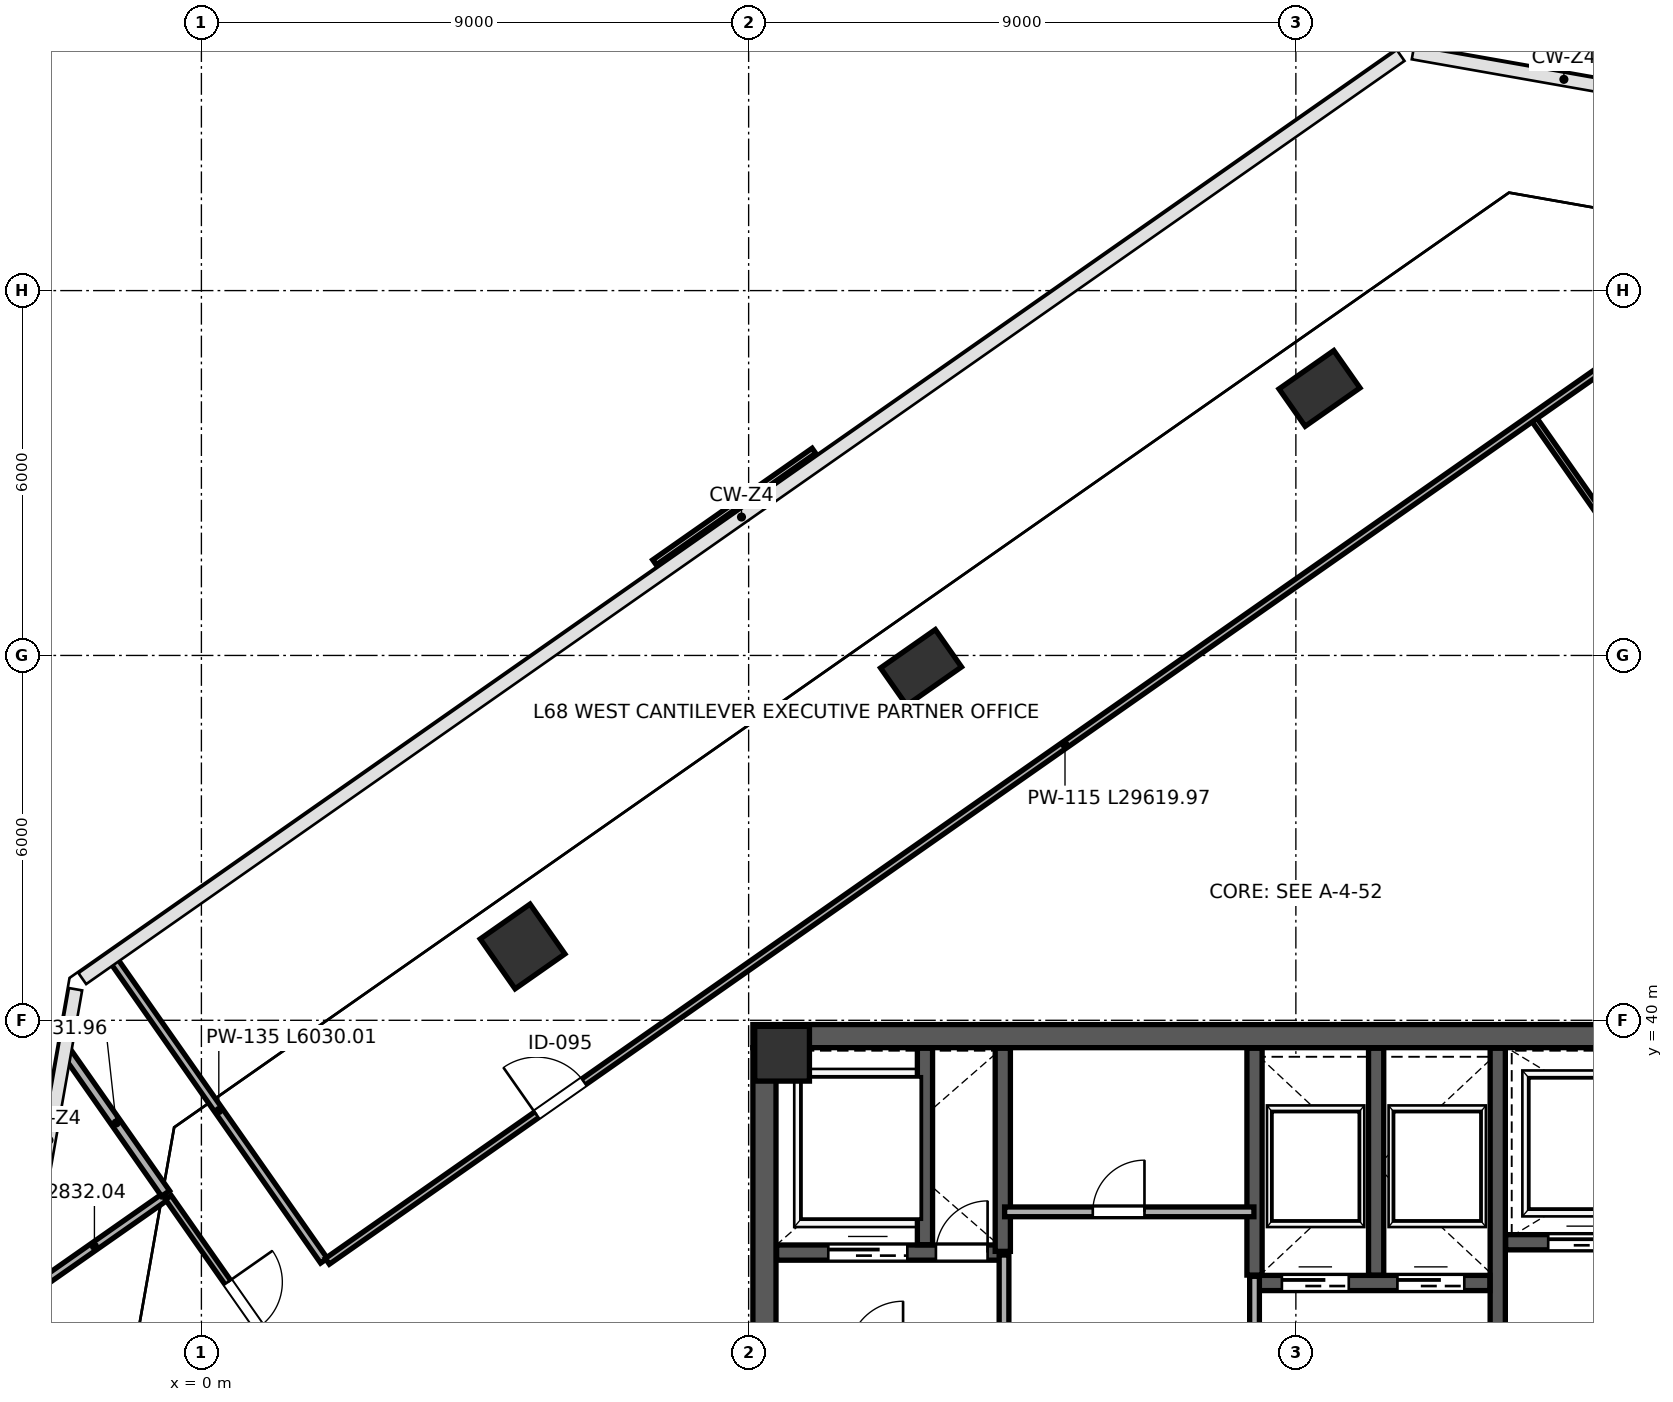
"""IFC4 building model, lengths in metres.
Left out: names, types, materials, properties, quantities, classifications, styles, units other than length and angle.
Written with IfcOpenShell. Run it as: python <this file> out.ifc"""

import sys

from ifc_helpers import new_model, si_unit, direction, frame, frame_2d, origin, origin_2d, place, context, subcontext, project, spatial, rectangle, extrude, clip, halfspace, source, transform, mapped, element, fill, save


model = new_model("IFC4")
c1 = context("Model", 3, precision=1e-05, world=origin(), true_north=direction((0.0, 1.0)))
c2 = subcontext(c1, "Body", "Model", "MODEL_VIEW")
j1 = project(units=[si_unit("LENGTHUNIT", "METRE"), si_unit("PLANEANGLEUNIT", "RADIAN")], contexts=[c1])
p1 = place(None, origin())
s1 = spatial("IfcSite", under=j1, at=p1, CompositionType="ELEMENT")
p2 = place(p1, origin())
s2 = spatial("IfcBuilding", under=s1, at=p2, CompositionType="ELEMENT")
p3 = place(p2, frame((0.0, 0.0, 303.0)))
s3 = spatial("IfcBuildingStorey", under=s2, at=p3, CompositionType="ELEMENT", Elevation=303.0)
m1 = source(origin(), c2, "Body", "SweptSolid", [
    extrude(rectangle(XDim=0.9, YDim=0.9, at=origin_2d()), origin(), (0.0, 0.0, 1.0), 4.198),
])
p4 = place(p3, frame((9.55, 39.45, 0.001), z_axis=(0.0, 0.0, 1.0), x_axis=(1.0, 0.0, 0.0)))
e1 = element("IfcColumn", 1, at=p4, inside=s3, PredefinedType="COLUMN", context=c2, shape_type="MappedRepresentation", body=[
    mapped(m1, transform((0.0, 0.0, 0.0), scale=1.0)),
])
p5 = place(p3, frame((5.282, 41.214, 0.0), z_axis=(0.097586490462, 0.163271900123, 0.981742921293), x_axis=(0.079753803382, -0.984561641117, 0.155813047227)))
e2 = element("IfcColumn", 2, at=p5, inside=s3, PredefinedType="COLUMN", context=c2, shape_type="Clipping", body=[
    clip(clip(extrude(rectangle(XDim=1.0, YDim=1.0, at=origin_2d()), origin(), (0.0, 0.0, 1.0), 4.278), halfspace(frame((0.0, 0.0, 0.136), z_axis=(0.0, 0.0, -1.0), x_axis=(1.0, 0.0, 0.0)), False)), halfspace(frame((0.0, 0.0, 4.142), z_axis=(0.0, 0.0, 1.0), x_axis=(1.0, 0.0, 0.0)), False)),
])
p6 = place(p3, frame((11.835, 45.803, 0.0), z_axis=(0.143375766237, 0.095793792698, 0.98502128857), x_axis=(-0.352266514368, -0.925179506593, 0.141248658171)))
e3 = element("IfcColumn", 3, at=p6, inside=s3, PredefinedType="PILASTER", context=c2, shape_type="Clipping", body=[
    clip(clip(extrude(rectangle(XDim=0.75, YDim=1.1, at=origin_2d()), origin(), (0.0, 0.0, 1.0), 4.264), halfspace(frame((0.0, 0.0, 0.11), z_axis=(0.0, 0.0, -1.0), x_axis=(1.0, 0.0, 0.0)), False)), halfspace(frame((0.0, 0.0, 4.154), z_axis=(0.0, 0.0, 1.0), x_axis=(1.0, 0.0, 0.0)), False)),
])
p7 = place(p3, frame((18.388, 50.391, 0.0), z_axis=(0.18821016759, 0.027620897851, 0.981740301107), x_axis=(-0.712388452059, -0.684267152176, 0.155824124661)))
e4 = element("IfcColumn", 4, at=p7, inside=s3, PredefinedType="PILASTER", context=c2, shape_type="Clipping", body=[
    clip(clip(extrude(rectangle(XDim=0.75, YDim=1.1, at=origin_2d()), origin(), (0.0, 0.0, 1.0), 4.278), halfspace(frame((0.0, 0.0, 0.121), z_axis=(0.0, 0.0, -1.0), x_axis=(1.0, 0.0, 0.0)), False)), halfspace(frame((0.0, 0.0, 4.157), z_axis=(0.0, 0.0, 1.0), x_axis=(1.0, 0.0, 0.0)), False)),
])
p8 = place(p3, frame((9.26, 24.45, 0.0), z_axis=(0.0, 0.0, 1.0), x_axis=(0.0, 1.0, 0.0)))
e5 = element("IfcWall", 5, at=p8, inside=s3, PredefinedType="SHEAR", context=c2, shape_type="SweptSolid", body=[
    extrude(rectangle(XDim=15.1, YDim=0.38, at=frame_2d((7.55, 0.0))), origin(), (0.0, 0.0, 1.0), 3.96),
])
p9 = place(p8, frame((8.7, 0.0, 0.0)))
e6 = element("IfcOpeningElement", 6, at=p9, cuts=e5, PredefinedType="OPENING", context=c2, shape_type="SweptSolid", body=[
    extrude(rectangle(XDim=1.15, YDim=2.2, at=frame_2d((0.575, 1.1))), frame((0.0, 0.2, 0.0), z_axis=(0.0, -1.0, 0.0), x_axis=(1.0, 0.0, 0.0)), (0.0, 0.0, 1.0), 0.4),
])
p10 = place(p3, frame((9.07, 39.74, 0.0), z_axis=(0.0, 0.0, 1.0), x_axis=(1.0, 0.0, 0.0)))
e7 = element("IfcWall", 7, at=p10, inside=s3, PredefinedType="SHEAR", context=c2, shape_type="SweptSolid", body=[
    extrude(rectangle(XDim=17.86, YDim=0.38, at=frame_2d((8.93, 0.0))), origin(), (0.0, 0.0, 1.0), 3.96),
])
p11 = place(p3, frame((21.32, 32.12, 0.0), z_axis=(0.0, 0.0, 1.0), x_axis=(0.0, 1.0, 0.0)))
e8 = element("IfcWall", 8, at=p11, inside=s3, PredefinedType="SHEAR", context=c2, shape_type="SweptSolid", body=[
    extrude(rectangle(XDim=7.42, YDim=0.25, at=frame_2d((3.71, 0.0))), origin(), (0.0, 0.0, 1.0), 3.96),
])
p12 = place(p11, frame((1.4, 0.0, 0.0)))
e9 = element("IfcOpeningElement", 9, at=p12, cuts=e8, PredefinedType="OPENING", context=c2, shape_type="SweptSolid", body=[
    extrude(rectangle(XDim=1.15, YDim=2.2, at=frame_2d((0.575, 1.1))), frame((0.0, 0.135, 0.0), z_axis=(0.0, -1.0, 0.0), x_axis=(1.0, 0.0, 0.0)), (0.0, 0.0, 1.0), 0.27),
])
p13 = place(p3, frame((9.46, 36.18, 0.0), z_axis=(0.0, 0.0, 1.0), x_axis=(1.0, 0.0, 0.0)))
e10 = element("IfcWall", 10, at=p13, inside=s3, PredefinedType="SHEAR", context=c2, shape_type="SweptSolid", body=[
    extrude(rectangle(XDim=3.79, YDim=0.25, at=frame_2d((1.895, 0.0))), origin(), (0.0, 0.0, 1.0), 3.96),
])
p14 = place(p13, frame((2.62, 0.0, 0.0)))
e11 = element("IfcOpeningElement", 11, at=p14, cuts=e10, PredefinedType="OPENING", context=c2, shape_type="SweptSolid", body=[
    extrude(rectangle(XDim=0.85, YDim=2.1, at=frame_2d((0.425, 1.05))), frame((0.0, 0.135, 0.0), z_axis=(0.0, -1.0, 0.0), x_axis=(1.0, 0.0, 0.0)), (0.0, 0.0, 1.0), 0.27),
])
p15 = place(p13, frame((0.85, 0.0, 0.0)))
e12 = element("IfcOpeningElement", 12, at=p15, cuts=e10, PredefinedType="OPENING", context=c2, shape_type="SweptSolid", body=[
    extrude(rectangle(XDim=1.3, YDim=2.25, at=frame_2d((0.65, 1.125))), frame((0.0, 0.135, 0.0), z_axis=(0.0, -1.0, 0.0), x_axis=(1.0, 0.0, 0.0)), (0.0, 0.0, 1.0), 0.27),
])
p16 = place(p3, frame((11.9, 36.31, 0.0), z_axis=(0.0, 0.0, 1.0), x_axis=(0.0, 1.0, 0.0)))
e13 = element("IfcWall", 13, at=p16, inside=s3, PredefinedType="SHEAR", context=c2, shape_type="SweptSolid", body=[
    extrude(rectangle(XDim=3.23, YDim=0.25, at=frame_2d((1.615, 0.0))), origin(), (0.0, 0.0, 1.0), 3.96),
])
p17 = place(p3, frame((21.45, 36.35, 0.0), z_axis=(0.0, 0.0, 1.0), x_axis=(1.0, 0.0, 0.0)))
e14 = element("IfcWall", 14, at=p17, inside=s3, PredefinedType="SHEAR", context=c2, shape_type="SweptSolid", body=[
    extrude(rectangle(XDim=5.09, YDim=0.25, at=frame_2d((2.545, 0.0))), origin(), (0.0, 0.0, 1.0), 3.96),
])
p18 = place(p17, frame((0.7, 0.0, 0.0)))
e15 = element("IfcOpeningElement", 15, at=p18, cuts=e14, PredefinedType="OPENING", context=c2, shape_type="SweptSolid", body=[
    extrude(rectangle(XDim=1.2, YDim=2.2, at=frame_2d((0.6, 1.1))), frame((0.0, 0.135, 0.0), z_axis=(0.0, -1.0, 0.0), x_axis=(1.0, 0.0, 0.0)), (0.0, 0.0, 1.0), 0.27),
])
p19 = place(p17, frame((3.25, 0.0, 0.0)))
e16 = element("IfcOpeningElement", 16, at=p19, cuts=e14, PredefinedType="OPENING", context=c2, shape_type="SweptSolid", body=[
    extrude(rectangle(XDim=1.2, YDim=2.2, at=frame_2d((0.6, 1.1))), frame((0.0, 0.135, 0.0), z_axis=(0.0, -1.0, 0.0), x_axis=(1.0, 0.0, 0.0)), (0.0, 0.0, 1.0), 0.27),
])
p20 = place(p3, frame((13.18, 36.2, 0.0), z_axis=(0.0, 0.0, 1.0), x_axis=(0.0, 1.0, 0.0)))
e17 = element("IfcWall", 17, at=p20, inside=s3, PredefinedType="SHEAR", context=c2, shape_type="SweptSolid", body=[
    extrude(rectangle(XDim=3.34, YDim=0.25, at=frame_2d((1.67, 0.0))), origin(), (0.0, 0.0, 1.0), 3.96),
])
p21 = place(p3, frame((17.32, 35.68, 0.0), z_axis=(0.0, 0.0, 1.0), x_axis=(1.0, 0.0, 0.0)))
e18 = element("IfcWall", 18, at=p21, inside=s3, PredefinedType="SHEAR", context=c2, shape_type="SweptSolid", body=[
    extrude(rectangle(XDim=3.87, YDim=0.25, at=frame_2d((1.935, 0.0))), origin(), (0.0, 0.0, 1.0), 3.96),
])
p22 = place(p21, frame((0.45, 0.0, 0.0)))
e19 = element("IfcOpeningElement", 19, at=p22, cuts=e18, PredefinedType="OPENING", context=c2, shape_type="SweptSolid", body=[
    extrude(rectangle(XDim=1.1, YDim=2.2, at=frame_2d((0.55, 1.1))), frame((0.0, 0.135, 0.0), z_axis=(0.0, -1.0, 0.0), x_axis=(1.0, 0.0, 0.0)), (0.0, 0.0, 1.0), 0.27),
])
p23 = place(p21, frame((2.35, 0.0, 0.0)))
e20 = element("IfcOpeningElement", 20, at=p23, cuts=e18, PredefinedType="OPENING", context=c2, shape_type="SweptSolid", body=[
    extrude(rectangle(XDim=1.1, YDim=2.2, at=frame_2d((0.55, 1.1))), frame((0.0, 0.135, 0.0), z_axis=(0.0, -1.0, 0.0), x_axis=(1.0, 0.0, 0.0)), (0.0, 0.0, 1.0), 0.27),
])
for number, where, z_axis, x_axis in (
    (21, (17.32, 35.81, 0.0), (0.0, 0.0, 1.0), (0.0, 1.0, 0.0)),
    (22, (19.32, 35.81, 0.0), (0.0, 0.0, 1.0), (0.0, 1.0, 0.0)),
):
    element("IfcWall", number, at=place(p3, frame(where, z_axis=z_axis, x_axis=x_axis)), inside=s3, PredefinedType="SHEAR", context=c2, shape_type="SweptSolid", body=[
        extrude(rectangle(XDim=3.73, YDim=0.25, at=frame_2d((1.865, 0.0))), origin(), (0.0, 0.0, 1.0), 3.96),
    ])
p24 = place(p3, frame((13.2, 34.57, 0.0), z_axis=(0.0, 0.0, 1.0), x_axis=(0.0, 1.0, 0.0)))
e23 = element("IfcWall", 23, at=p24, inside=s3, PredefinedType="PARTITIONING", context=c2, shape_type="SweptSolid", body=[
    extrude(rectangle(XDim=1.57, YDim=0.16, at=frame_2d((0.785, 0.0))), origin(), (0.0, 0.0, 1.0), 3.96),
])
p25 = place(p3, frame((17.32, 33.86, 0.0), z_axis=(0.0, 0.0, 1.0), x_axis=(0.0, 1.0, 0.0)))
e24 = element("IfcWall", 24, at=p25, inside=s3, PredefinedType="PARTITIONING", context=c2, shape_type="SweptSolid", body=[
    extrude(rectangle(XDim=1.93, YDim=0.16, at=frame_2d((0.965, 0.0))), origin(), (0.0, 0.0, 1.0), 3.96),
])
p26 = place(p3, frame((13.21, 36.85, 0.0), z_axis=(0.0, 0.0, 1.0), x_axis=(1.0, 0.0, 0.0)))
e25 = element("IfcWall", 25, at=p26, inside=s3, PredefinedType="PARTITIONING", context=c2, shape_type="SweptSolid", body=[
    extrude(rectangle(XDim=4.1, YDim=0.16, at=frame_2d((2.05, 0.0))), origin(), (0.0, 0.0, 1.0), 3.96),
])
p27 = place(p26, frame((1.45, 0.0, 0.0)))
e26 = element("IfcOpeningElement", 26, at=p27, cuts=e25, PredefinedType="OPENING", context=c2, shape_type="SweptSolid", body=[
    extrude(rectangle(XDim=0.85, YDim=2.1, at=frame_2d((0.425, 1.05))), frame((0.0, 0.09, 0.0), z_axis=(0.0, -1.0, 0.0), x_axis=(1.0, 0.0, 0.0)), (0.0, 0.0, 1.0), 0.18),
])
p28 = place(p3, frame((-2.919, 35.471, 0.0), z_axis=(0.0, 0.0, 1.0), x_axis=(0.819098241059, 0.573653267657, 0.0)))
e27 = element("IfcWall", 27, at=p28, inside=s3, PredefinedType="PARTITIONING", context=c2, shape_type="SweptSolid", body=[
    extrude(rectangle(XDim=2.832, YDim=0.135, at=frame_2d((1.416, 0.0))), origin(), (0.0, 0.0, 1.0), 3.96),
])
p29 = place(p3, frame((-2.214, 39.471, 0.0), z_axis=(0.0, 0.0, 1.0), x_axis=(0.573653267657, -0.819098241059, 0.0)))
e28 = element("IfcWall", 28, at=p29, inside=s3, PredefinedType="PARTITIONING", context=c2, shape_type="SweptSolid", body=[
    extrude(rectangle(XDim=2.832, YDim=0.16, at=frame_2d((1.416, 0.0))), origin(), (0.0, 0.0, 1.0), 3.96),
])
p30 = place(p3, frame((-0.544, 37.086, 0.0), z_axis=(0.0, 0.0, 1.0), x_axis=(0.573568336404, -0.819157715873, 0.0)))
e29 = element("IfcWall", 29, at=p30, inside=s3, PredefinedType="PARTITIONING", context=c2, shape_type="SweptSolid", body=[
    extrude(rectangle(XDim=7.42, YDim=0.115, at=frame_2d((3.71, 0.0))), origin(), (0.0, 0.0, 1.0), 3.96),
])
p31 = place(p30, frame((1.7, 0.0, 0.0)))
e30 = element("IfcOpeningElement", 30, at=p31, cuts=e29, PredefinedType="OPENING", context=c2, shape_type="SweptSolid", body=[
    extrude(rectangle(XDim=0.9, YDim=2.15, at=frame_2d((0.45, 1.075))), frame((0.0, 0.067, 0.0), z_axis=(0.0, -1.0, 0.0), x_axis=(1.0, 0.0, 0.0)), (0.0, 0.0, 1.0), 0.135),
])
p32 = place(p30, frame((5.0, 0.0, 0.0)))
e31 = element("IfcOpeningElement", 31, at=p32, cuts=e29, PredefinedType="OPENING", context=c2, shape_type="SweptSolid", body=[
    extrude(rectangle(XDim=0.95, YDim=2.15, at=frame_2d((0.475, 1.075))), frame((0.0, 0.067, 0.0), z_axis=(0.0, -1.0, 0.0), x_axis=(1.0, 0.0, 0.0)), (0.0, 0.0, 1.0), 0.135),
])
p33 = place(p3, frame((21.918, 49.884, 0.0), z_axis=(0.0, 0.0, 1.0), x_axis=(0.57358495776, -0.819146077468, 0.0)))
e32 = element("IfcWall", 32, at=p33, inside=s3, PredefinedType="PARTITIONING", context=c2, shape_type="SweptSolid", body=[
    extrude(rectangle(XDim=25.79, YDim=0.1, at=frame_2d((12.895, 0.0))), origin(), (0.0, 0.0, 1.0), 3.96),
])
p34 = place(p33, frame((9.2, 0.0, 0.0)))
e33 = element("IfcOpeningElement", 33, at=p34, cuts=e32, PredefinedType="OPENING", context=c2, shape_type="SweptSolid", body=[
    extrude(rectangle(XDim=0.95, YDim=2.15, at=frame_2d((0.475, 1.075))), frame((0.0, 0.06, 0.0), z_axis=(0.0, -1.0, 0.0), x_axis=(1.0, 0.0, 0.0)), (0.0, 0.0, 1.0), 0.12),
])
p35 = place(p3, frame((-1.443, 40.985, 0.0), z_axis=(0.0, 0.0, 1.0), x_axis=(0.573587332855, -0.819144414367, 0.0)))
e34 = element("IfcWall", 34, at=p35, inside=s3, PredefinedType="PARTITIONING", context=c2, shape_type="SweptSolid", body=[
    extrude(rectangle(XDim=6.03, YDim=0.135, at=frame_2d((3.015, 0.0))), origin(), (0.0, 0.0, 1.0), 3.96),
])
p36 = place(p3, frame((2.071, 36.036, 0.0), z_axis=(0.0, 0.0, 1.0), x_axis=(0.819154854942, 0.573572422302, 0.0)))
e35 = element("IfcWall", 35, at=p36, inside=s3, PredefinedType="PARTITIONING", context=c2, shape_type="SweptSolid", body=[
    extrude(rectangle(XDim=29.62, YDim=0.115, at=frame_2d((14.81, 0.0))), origin(), (0.0, 0.0, 1.0), 3.96),
])
p37 = place(p36, frame((4.2, 0.0, 0.0)))
e36 = element("IfcOpeningElement", 36, at=p37, cuts=e35, PredefinedType="OPENING", context=c2, shape_type="SweptSolid", body=[
    extrude(rectangle(XDim=0.95, YDim=2.15, at=frame_2d((0.475, 1.075))), frame((0.0, 0.067, 0.0), z_axis=(0.0, -1.0, 0.0), x_axis=(1.0, 0.0, 0.0)), (0.0, 0.0, 1.0), 0.135),
])
m2 = source(origin(), c2, "Body", "SweptSolid", [
    extrude(rectangle(XDim=0.85, YDim=2.1, at=frame_2d((0.425, 1.05))), frame((0.0, 0.025, 0.0), z_axis=(0.0, -1.0, 0.0), x_axis=(1.0, 0.0, 0.0)), (0.0, 0.0, 1.0), 0.05),
])
p38 = place(p14, origin())
e37 = element("IfcDoor", 37, at=p38, inside=s3, OperationType="SINGLE_SWING_RIGHT", PredefinedType="DOOR", context=c2, shape_type="MappedRepresentation", body=[
    mapped(m2, transform((0.0, 0.0, 0.0), scale=1.0)),
])
fill(e11, e37)
m3 = source(origin(), c2, "Body", "SweptSolid", [
    extrude(rectangle(XDim=1.1, YDim=2.2, at=frame_2d((0.55, 1.1))), frame((0.0, 0.025, 0.0), z_axis=(0.0, -1.0, 0.0), x_axis=(1.0, 0.0, 0.0)), (0.0, 0.0, 1.0), 0.05),
])
p39 = place(p22, origin())
e38 = element("IfcDoor", 38, at=p39, inside=s3, OperationType="SLIDING_TO_LEFT", PredefinedType="DOOR", context=c2, shape_type="MappedRepresentation", body=[
    mapped(m3, transform((0.0, 0.0, 0.0), scale=1.0)),
])
fill(e19, e38)
p40 = place(p23, origin())
e39 = element("IfcDoor", 39, at=p40, inside=s3, OperationType="SLIDING_TO_RIGHT", PredefinedType="DOOR", context=c2, shape_type="MappedRepresentation", body=[
    mapped(m3, transform((0.0, 0.0, 0.0), scale=1.0)),
])
fill(e20, e39)
m4 = source(origin(), c2, "Body", "SweptSolid", [
    extrude(rectangle(XDim=1.2, YDim=2.2, at=frame_2d((0.6, 1.1))), frame((0.0, 0.025, 0.0), z_axis=(0.0, -1.0, 0.0), x_axis=(1.0, 0.0, 0.0)), (0.0, 0.0, 1.0), 0.05),
])
p41 = place(p18, origin())
e40 = element("IfcDoor", 40, at=p41, inside=s3, OperationType="SLIDING_TO_LEFT", PredefinedType="DOOR", context=c2, shape_type="MappedRepresentation", body=[
    mapped(m4, transform((0.0, 0.0, 0.0), scale=1.0)),
])
fill(e15, e40)
m5 = source(origin(), c2, "Body", "SweptSolid", [
    extrude(rectangle(XDim=1.3, YDim=2.25, at=frame_2d((0.65, 1.125))), frame((0.0, 0.025, 0.0), z_axis=(0.0, -1.0, 0.0), x_axis=(1.0, 0.0, 0.0)), (0.0, 0.0, 1.0), 0.05),
])
p42 = place(p15, origin())
e41 = element("IfcDoor", 41, at=p42, inside=s3, OperationType="SLIDING_TO_LEFT", PredefinedType="DOOR", context=c2, shape_type="MappedRepresentation", body=[
    mapped(m5, transform((0.0, 0.0, 0.0), scale=1.0)),
])
fill(e12, e41)
p43 = place(p27, origin())
e42 = element("IfcDoor", 42, at=p43, inside=s3, OperationType="SINGLE_SWING_RIGHT", PredefinedType="DOOR", context=c2, shape_type="MappedRepresentation", body=[
    mapped(m2, transform((0.0, 0.0, 0.0), scale=1.0)),
])
fill(e26, e42)
m6 = source(origin(), c2, "Body", "SweptSolid", [
    extrude(rectangle(XDim=0.9, YDim=2.15, at=frame_2d((0.45, 1.075))), frame((0.0, 0.025, 0.0), z_axis=(0.0, -1.0, 0.0), x_axis=(1.0, 0.0, 0.0)), (0.0, 0.0, 1.0), 0.05),
])
p44 = place(p31, origin())
e43 = element("IfcDoor", 43, at=p44, inside=s3, OperationType="SINGLE_SWING_LEFT", PredefinedType="DOOR", context=c2, shape_type="MappedRepresentation", body=[
    mapped(m6, transform((0.0, 0.0, 0.0), scale=1.0)),
])
fill(e30, e43)
m7 = source(origin(), c2, "Body", "SweptSolid", [
    extrude(rectangle(XDim=0.95, YDim=2.15, at=frame_2d((0.475, 1.075))), frame((0.0, 0.025, 0.0), z_axis=(0.0, -1.0, 0.0), x_axis=(1.0, 0.0, 0.0)), (0.0, 0.0, 1.0), 0.05),
])
p45 = place(p37, origin())
e44 = element("IfcDoor", 44, at=p45, inside=s3, OperationType="SINGLE_SWING_LEFT", PredefinedType="DOOR", context=c2, shape_type="MappedRepresentation", body=[
    mapped(m7, transform((0.0, 0.0, 0.0), scale=1.0)),
])
fill(e36, e44)
save(model, sys.argv[1])
